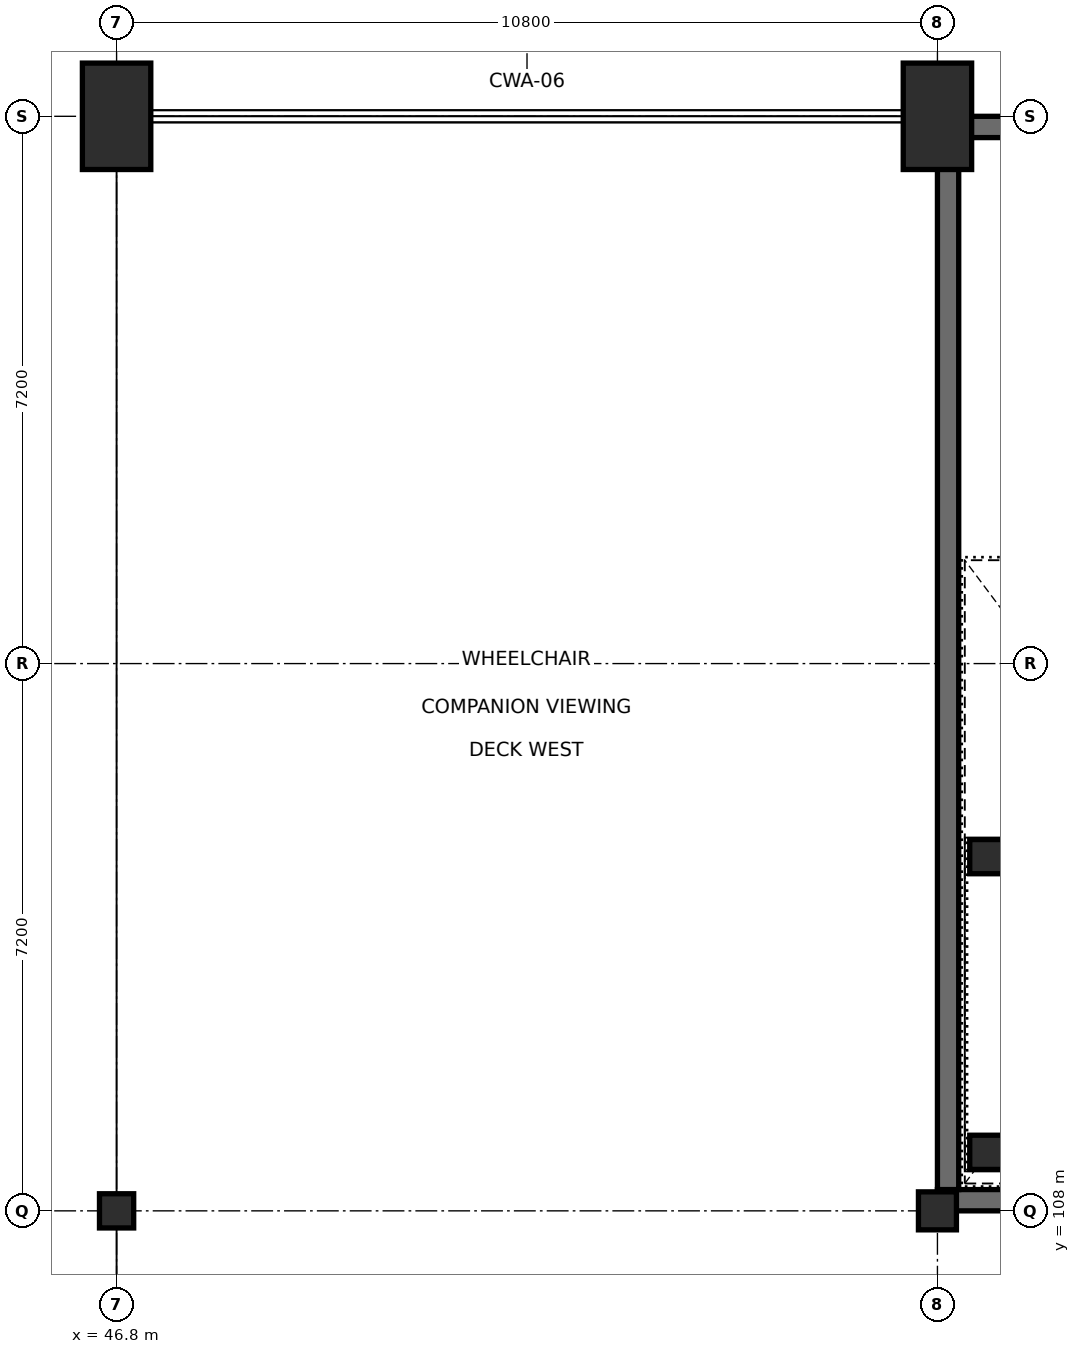
"""IFC4 building model, lengths in metres.
Left out: names, types, materials, properties, quantities, classifications, styles, units other than length and angle.
Written with IfcOpenShell. Run it as: python <this file> out.ifc"""

import sys

from ifc_helpers import new_model, si_unit, direction, frame, frame_2d, origin, origin_2d, place, context, subcontext, project, spatial, rectangle, extrude, element, save


model = new_model("IFC4")
c1 = context("Model", 3, precision=1e-05, world=origin(), true_north=direction((0.0, 1.0)))
c2 = subcontext(c1, "Body", "Model", "MODEL_VIEW")
j1 = project(units=[si_unit("LENGTHUNIT", "METRE"), si_unit("PLANEANGLEUNIT", "RADIAN")], contexts=[c1])
p1 = place(None, origin())
s1 = spatial("IfcSite", under=j1, at=p1, CompositionType="ELEMENT")
p2 = place(p1, origin())
s2 = spatial("IfcBuilding", under=s1, at=p2, CompositionType="ELEMENT")
p3 = place(p2, frame((0.0, 0.0, 4.8)))
s3 = spatial("IfcBuildingStorey", under=s2, at=p3, CompositionType="ELEMENT", Elevation=4.8)
for number, where, z_axis, x_axis in (
    (1, (46.8, 122.4, 0.0), (0.0, 0.0, 1.0), (1.0, 0.0, 0.0)),
    (2, (57.6, 122.4, 0.0), (0.0, 0.0, 1.0), (1.0, 0.0, 0.0)),
):
    element("IfcColumn", number, at=place(p3, frame(where, z_axis=z_axis, x_axis=x_axis)), inside=s3, PredefinedType="COLUMN", context=c2, shape_type="SweptSolid", body=[
        extrude(rectangle(XDim=0.9, YDim=1.4, at=origin_2d()), origin(), (0.0, 0.0, 1.0), 4.8),
    ])
p4 = place(p3, frame((57.6, 108.0, 0.0), z_axis=(0.0, 0.0, 1.0), x_axis=(1.0, 0.0, 0.0)))
e3 = element("IfcColumn", 3, at=p4, inside=s3, PredefinedType="COLUMN", context=c2, shape_type="SweptSolid", body=[
    extrude(rectangle(XDim=0.5, YDim=0.5, at=origin_2d()), origin(), (0.0, 0.0, 1.0), 4.8),
])
p5 = place(p3, frame((46.8, 108.0, 0.0), z_axis=(0.0, 0.0, 1.0), x_axis=(1.0, 0.0, 0.0)))
e4 = element("IfcColumn", 4, at=p5, inside=s3, PredefinedType="COLUMN", context=c2, shape_type="SweptSolid", body=[
    extrude(rectangle(XDim=0.45, YDim=0.45, at=origin_2d()), origin(), (0.0, 0.0, 1.0), 4.8),
])
for number, where, z_axis, x_axis in (
    (5, (57.6, 108.14, 0.0), (0.0, 0.0, 1.0), (1.0, 0.0, 0.0)),
    (6, (57.6, 122.26, 0.0), (0.0, 0.0, 1.0), (1.0, 0.0, 0.0)),
):
    element("IfcWall", number, at=place(p3, frame(where, z_axis=z_axis, x_axis=x_axis)), inside=s3, PredefinedType="SHEAR", context=c2, shape_type="SweptSolid", body=[
        extrude(rectangle(XDim=10.8, YDim=0.28, at=frame_2d((5.4, 0.0))), origin(), (0.0, 0.0, 1.0), 4.8),
    ])
p6 = place(p3, frame((57.74, 108.28, 0.0), z_axis=(0.0, 0.0, 1.0), x_axis=(0.0, 1.0, 0.0)))
e7 = element("IfcWall", 7, at=p6, inside=s3, PredefinedType="SHEAR", context=c2, shape_type="SweptSolid", body=[
    extrude(rectangle(XDim=13.84, YDim=0.28, at=frame_2d((6.92, 0.0))), origin(), (0.0, 0.0, 1.0), 4.8),
])
for number, where, z_axis, x_axis in (
    (8, (58.25, 108.77, 0.0), (0.0, 0.0, 1.0), (1.0, 0.0, 0.0)),
    (9, (58.25, 112.66, 0.0), (0.0, 0.0, 1.0), (1.0, 0.0, 0.0)),
):
    element("IfcColumn", number, at=place(p3, frame(where, z_axis=z_axis, x_axis=x_axis)), inside=s3, PredefinedType="COLUMN", context=c2, shape_type="SweptSolid", body=[
        extrude(rectangle(XDim=0.45, YDim=0.45, at=origin_2d()), origin(), (0.0, 0.0, 1.0), 4.8),
    ])
save(model, sys.argv[1])
